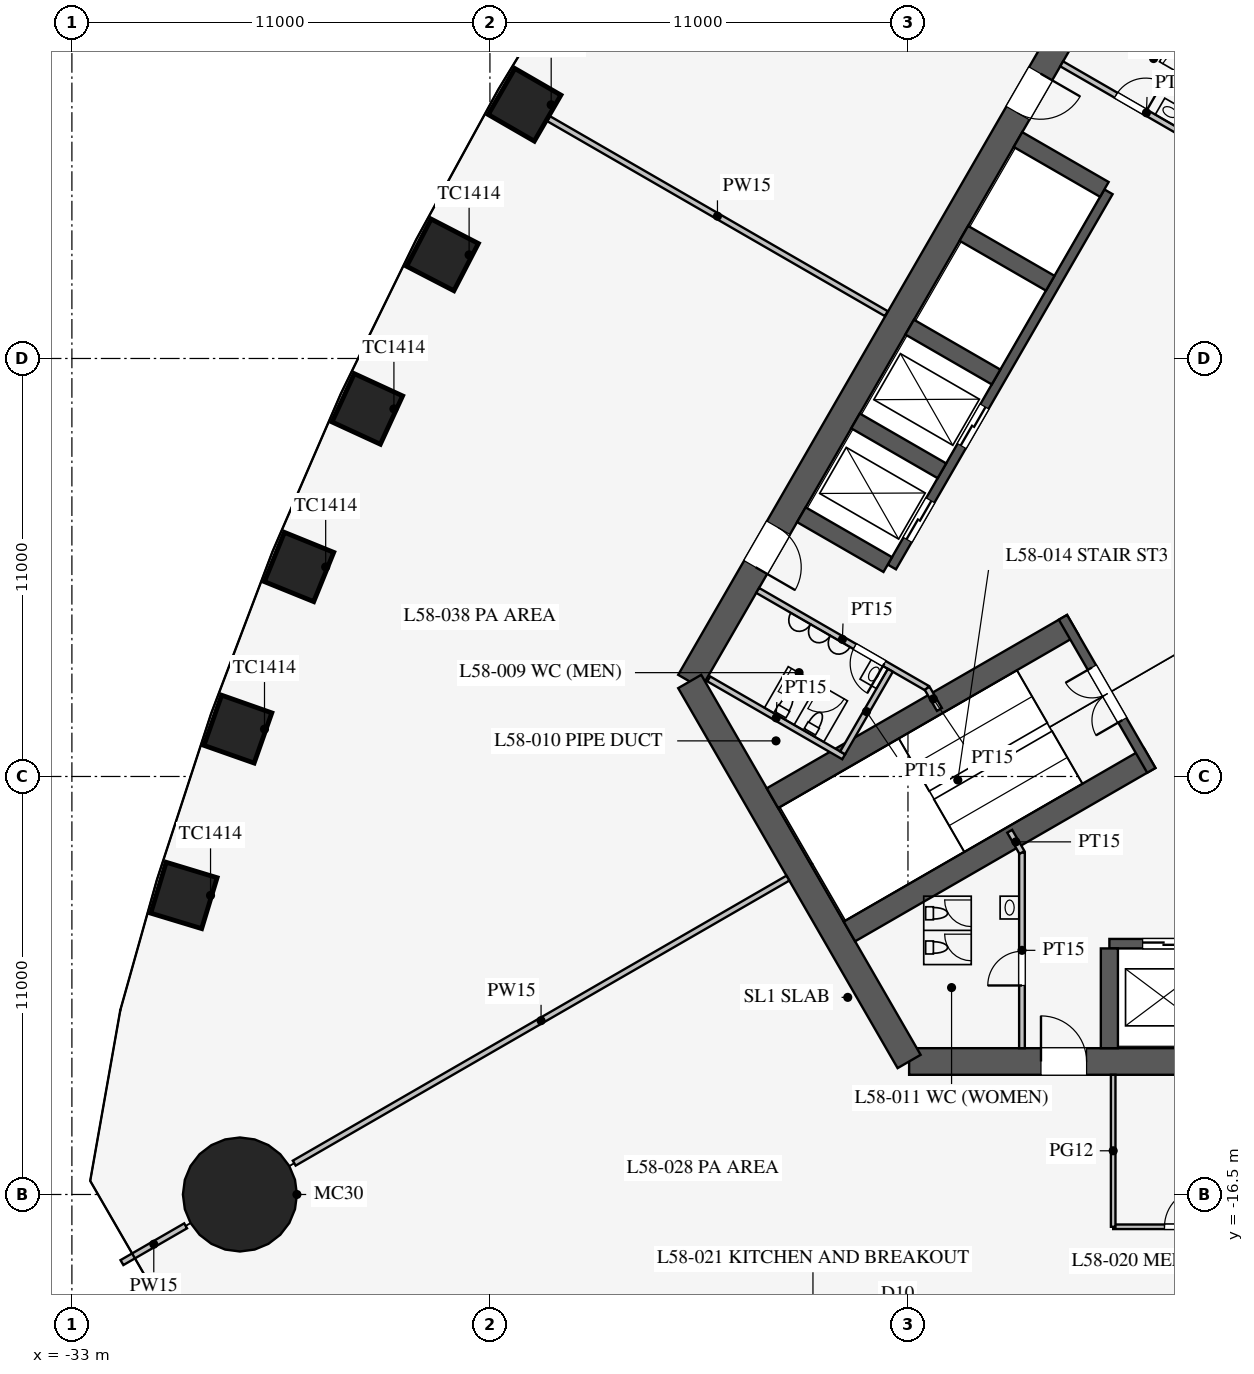
"""IFC4 building model, lengths in metres.
Left out: names, types, materials, properties, quantities, classifications, styles, units other than length and angle.
Written with IfcOpenShell. Run it as: python <this file> out.ifc"""

import sys

from ifc_helpers import new_model, si_unit, direction, frame, frame_2d, origin, origin_2d, place, context, subcontext, project, spatial, rectangle, circle, extrude, element, fill, save


model = new_model("IFC4")
c1 = context("Model", 3, precision=1e-05, world=origin(), true_north=direction((0.0, 1.0)))
c2 = subcontext(c1, "Body", "Model", "MODEL_VIEW")
j1 = project(units=[si_unit("LENGTHUNIT", "METRE"), si_unit("PLANEANGLEUNIT", "RADIAN")], contexts=[c1])
p1 = place(None, origin())
s1 = spatial("IfcSite", under=j1, at=p1, CompositionType="ELEMENT")
p2 = place(p1, origin())
s2 = spatial("IfcBuilding", under=s1, at=p2, CompositionType="ELEMENT")
p3 = place(p2, frame((0.0, 0.0, 252.7)))
s3 = spatial("IfcBuildingStorey", under=s2, at=p3, CompositionType="ELEMENT", Elevation=252.7)
for number, where, z_axis, x_axis in (
    (1, (-21.088, 12.175, 0.0), (0.0, 0.0, 1.0), (-0.5, -0.866, 0.0)),
    (2, (-23.248, 8.226, 0.0), (0.0, 0.0, 1.0), (-0.46, -0.888, 0.0)),
    (3, (-25.227, 4.172, 0.0), (0.0, 0.0, 1.0), (-0.418, -0.908, 0.0)),
    (4, (-27.022, 0.013, 0.0), (0.0, 0.0, 1.0), (-0.376, -0.927, 0.0)),
    (5, (-28.632, -4.254, 0.0), (0.0, 0.0, 1.0), (-0.332, -0.943, 0.0)),
    (6, (-30.052, -8.63, 0.0), (0.0, 0.0, 1.0), (-0.29, -0.957, 0.0)),
):
    element("IfcColumn", number, at=place(p3, frame(where, z_axis=z_axis, x_axis=x_axis)), inside=s3, PredefinedType="COLUMN", context=c2, shape_type="SweptSolid", body=[
        extrude(rectangle(XDim=1.4, YDim=1.4, at=origin_2d()), origin(), (0.0, 0.0, 1.0), 4.2),
    ])
p4 = place(p3, frame((-28.579, -16.5, 0.0), z_axis=(0.0, 0.0, 1.0), x_axis=(1.0, 0.0, 0.0)))
e7 = element("IfcColumn", 7, at=p4, inside=s3, PredefinedType="COLUMN", context=c2, shape_type="SweptSolid", body=[
    extrude(circle(Radius=1.5, at=origin_2d()), origin(), (0.0, 0.0, 1.0), 4.2),
])
p5 = place(p3, frame((-10.97, -13.0, 0.0), z_axis=(0.0, 0.0, 1.0), x_axis=(1.0, 0.0, 0.0)))
e8 = element("IfcWall", 8, at=p5, inside=s3, PredefinedType="SHEAR", context=c2, shape_type="SweptSolid", body=[
    extrude(rectangle(XDim=21.939, YDim=0.7, at=frame_2d((10.97, 0.0))), origin(), (0.0, 0.0, 1.0), 4.2),
])
p6 = place(p5, frame((17.27, 0.0, 0.0)))
e9 = element("IfcOpeningElement", 9, at=p6, cuts=e8, PredefinedType="OPENING", context=c2, shape_type="SweptSolid", body=[
    extrude(rectangle(XDim=1.2, YDim=2.1, at=frame_2d((0.6, 1.05))), frame((0.0, 0.36, 0.0), z_axis=(0.0, -1.0, 0.0), x_axis=(1.0, 0.0, 0.0)), (0.0, 0.0, 1.0), 0.72),
])
p7 = place(p5, frame((3.47, 0.0, 0.0)))
e10 = element("IfcOpeningElement", 10, at=p7, cuts=e8, PredefinedType="OPENING", context=c2, shape_type="SweptSolid", body=[
    extrude(rectangle(XDim=1.2, YDim=2.1, at=frame_2d((0.6, 1.05))), frame((0.0, 0.36, 0.0), z_axis=(0.0, -1.0, 0.0), x_axis=(1.0, 0.0, 0.0)), (0.0, 0.0, 1.0), 0.72),
])
p8 = place(p3, frame((-5.773, 16.0, 0.0), z_axis=(0.0, 0.0, 1.0), x_axis=(-0.500002442456, -0.866023993627, 0.0)))
e11 = element("IfcWall", 11, at=p8, inside=s3, PredefinedType="SHEAR", context=c2, shape_type="SweptSolid", body=[
    extrude(rectangle(XDim=21.939, YDim=0.7, at=frame_2d((10.97, 0.0))), origin(), (0.0, 0.0, 1.0), 4.2),
])
p9 = place(p8, frame((17.27, 0.0, 0.0)))
e12 = element("IfcOpeningElement", 12, at=p9, cuts=e11, PredefinedType="OPENING", context=c2, shape_type="SweptSolid", body=[
    extrude(rectangle(XDim=1.2, YDim=2.1, at=frame_2d((0.6, 1.05))), frame((0.0, 0.36, 0.0), z_axis=(0.0, -1.0, 0.0), x_axis=(1.0, 0.0, 0.0)), (0.0, 0.0, 1.0), 0.72),
])
p10 = place(p8, frame((3.47, 0.0, 0.0)))
e13 = element("IfcOpeningElement", 13, at=p10, cuts=e11, PredefinedType="OPENING", context=c2, shape_type="SweptSolid", body=[
    extrude(rectangle(XDim=1.2, YDim=2.1, at=frame_2d((0.6, 1.05))), frame((0.0, 0.36, 0.0), z_axis=(0.0, -1.0, 0.0), x_axis=(1.0, 0.0, 0.0)), (0.0, 0.0, 1.0), 0.72),
])
p11 = place(p3, frame((-16.743, -3.0, 0.0), z_axis=(0.0, 0.0, 1.0), x_axis=(0.499995765644, -0.866027848477, 0.0)))
e14 = element("IfcWall", 14, at=p11, inside=s3, PredefinedType="SHEAR", context=c2, shape_type="SweptSolid", body=[
    extrude(rectangle(XDim=11.547, YDim=0.7, at=frame_2d((5.773, 0.0))), origin(), (0.0, 0.0, 1.0), 4.2),
])
p12 = place(p3, frame((-5.7, -9.9, 0.0), z_axis=(0.0, 0.0, 1.0), x_axis=(1.0, 0.0, 0.0)))
e15 = element("IfcWall", 15, at=p12, inside=s3, PredefinedType="SHEAR", context=c2, shape_type="SweptSolid", body=[
    extrude(rectangle(XDim=11.4, YDim=0.25, at=frame_2d((5.7, 0.0))), origin(), (0.0, 0.0, 1.0), 4.2),
])
p13 = place(p12, frame((0.875, 0.0, 0.0)))
e16 = element("IfcOpeningElement", 16, at=p13, cuts=e15, PredefinedType="OPENING", context=c2, shape_type="SweptSolid", body=[
    extrude(rectangle(XDim=1.1, YDim=2.2, at=frame_2d((0.55, 1.1))), frame((0.0, 0.135, 0.0), z_axis=(0.0, -1.0, 0.0), x_axis=(1.0, 0.0, 0.0)), (0.0, 0.0, 1.0), 0.27),
])
p14 = place(p12, frame((3.725, 0.0, 0.0)))
e17 = element("IfcOpeningElement", 17, at=p14, cuts=e15, PredefinedType="OPENING", context=c2, shape_type="SweptSolid", body=[
    extrude(rectangle(XDim=1.1, YDim=2.2, at=frame_2d((0.55, 1.1))), frame((0.0, 0.135, 0.0), z_axis=(0.0, -1.0, 0.0), x_axis=(1.0, 0.0, 0.0)), (0.0, 0.0, 1.0), 0.27),
])
p15 = place(p12, frame((6.575, 0.0, 0.0)))
e18 = element("IfcOpeningElement", 18, at=p15, cuts=e15, PredefinedType="OPENING", context=c2, shape_type="SweptSolid", body=[
    extrude(rectangle(XDim=1.1, YDim=2.2, at=frame_2d((0.55, 1.1))), frame((0.0, 0.135, 0.0), z_axis=(0.0, -1.0, 0.0), x_axis=(1.0, 0.0, 0.0)), (0.0, 0.0, 1.0), 0.27),
])
p16 = place(p12, frame((9.425, 0.0, 0.0)))
e19 = element("IfcOpeningElement", 19, at=p16, cuts=e15, PredefinedType="OPENING", context=c2, shape_type="SweptSolid", body=[
    extrude(rectangle(XDim=1.1, YDim=2.2, at=frame_2d((0.55, 1.1))), frame((0.0, 0.135, 0.0), z_axis=(0.0, -1.0, 0.0), x_axis=(1.0, 0.0, 0.0)), (0.0, 0.0, 1.0), 0.27),
])
p17 = place(p3, frame((-5.7, -10.025, 0.0), z_axis=(0.0, 0.0, 1.0), x_axis=(0.0, -1.0, 0.0)))
e20 = element("IfcWall", 20, at=p17, inside=s3, PredefinedType="SHEAR", context=c2, shape_type="SweptSolid", body=[
    extrude(rectangle(XDim=2.625, YDim=0.45, at=frame_2d((1.312, 0.0))), origin(), (0.0, 0.0, 1.0), 4.2),
])
p18 = place(p3, frame((-5.724, 9.886, 0.0), z_axis=(0.0, 0.0, 1.0), x_axis=(-0.500001763848, -0.866024385424, 0.0)))
e21 = element("IfcWall", 21, at=p18, inside=s3, PredefinedType="SHEAR", context=c2, shape_type="SweptSolid", body=[
    extrude(rectangle(XDim=11.4, YDim=0.25, at=frame_2d((5.7, 0.0))), origin(), (0.0, 0.0, 1.0), 4.2),
])
p19 = place(p18, frame((6.525, 0.0, 0.0)))
e22 = element("IfcOpeningElement", 22, at=p19, cuts=e21, PredefinedType="OPENING", context=c2, shape_type="SweptSolid", body=[
    extrude(rectangle(XDim=1.2, YDim=2.2, at=frame_2d((0.6, 1.1))), frame((0.0, 0.135, 0.0), z_axis=(0.0, -1.0, 0.0), x_axis=(1.0, 0.0, 0.0)), (0.0, 0.0, 1.0), 0.27),
])
p20 = place(p18, frame((9.375, 0.0, 0.0)))
e23 = element("IfcOpeningElement", 23, at=p20, cuts=e21, PredefinedType="OPENING", context=c2, shape_type="SweptSolid", body=[
    extrude(rectangle(XDim=1.2, YDim=2.2, at=frame_2d((0.6, 1.1))), frame((0.0, 0.135, 0.0), z_axis=(0.0, -1.0, 0.0), x_axis=(1.0, 0.0, 0.0)), (0.0, 0.0, 1.0), 0.27),
])
for number, where, z_axis, x_axis in (
    (24, (-5.832, 9.949, 0.0), (0.0, 0.0, 1.0), (-0.866, 0.5, 0.0)),
    (25, (-7.257, 7.481, 0.0), (0.0, 0.0, 1.0), (-0.866, 0.5, 0.0)),
    (26, (-8.682, 5.012, 0.0), (0.0, 0.0, 1.0), (-0.866, 0.5, 0.0)),
    (27, (-10.107, 2.544, 0.0), (0.0, 0.0, 1.0), (-0.866, 0.5, 0.0)),
    (28, (-11.532, 0.076, 0.0), (0.0, 0.0, 1.0), (-0.866, 0.5, 0.0)),
):
    element("IfcWall", number, at=place(p3, frame(where, z_axis=z_axis, x_axis=x_axis)), inside=s3, PredefinedType="SHEAR", context=c2, shape_type="SweptSolid", body=[
        extrude(rectangle(XDim=2.625, YDim=0.45, at=frame_2d((1.312, 0.0))), origin(), (0.0, 0.0, 1.0), 4.2),
    ])
for number, where, z_axis, x_axis in (
    (29, (-6.663, -1.509, 0.0), (0.0, 0.0, 1.0), (-0.866, -0.5, 0.0)),
    (30, (-4.638, -5.016, 0.0), (0.0, 0.0, 1.0), (-0.866, -0.5, 0.0)),
):
    element("IfcWall", number, at=place(p3, frame(where, z_axis=z_axis, x_axis=x_axis)), inside=s3, PredefinedType="SHEAR", context=c2, shape_type="SweptSolid", body=[
        extrude(rectangle(XDim=9.125, YDim=0.6, at=frame_2d((4.562, 0.0))), origin(), (0.0, 0.0, 1.0), 4.2),
    ])
p21 = place(p3, frame((-6.922, -1.312, 0.0), z_axis=(0.0, 0.0, 1.0), x_axis=(0.499984536904, -0.866034331223, 0.0)))
e31 = element("IfcWall", 31, at=p21, inside=s3, PredefinedType="SHEAR", context=c2, shape_type="SweptSolid", body=[
    extrude(rectangle(XDim=4.65, YDim=0.25, at=frame_2d((2.325, 0.0))), origin(), (0.0, 0.0, 1.0), 4.2),
])
p22 = place(p21, frame((1.525, 0.0, 0.0)))
e32 = element("IfcOpeningElement", 32, at=p22, cuts=e31, PredefinedType="OPENING", context=c2, shape_type="SweptSolid", body=[
    extrude(rectangle(XDim=1.6, YDim=2.1, at=frame_2d((0.8, 1.05))), frame((0.0, 0.135, 0.0), z_axis=(0.0, -1.0, 0.0), x_axis=(1.0, 0.0, 0.0)), (0.0, 0.0, 1.0), 0.27),
])
p23 = place(p3, frame((-8.0, -7.5, 0.0), z_axis=(0.0, 0.0, 1.0), x_axis=(0.0, -1.0, 0.0)))
e33 = element("IfcWall", 33, at=p23, inside=s3, PredefinedType="PARTITIONING", context=c2, shape_type="SweptSolid", body=[
    extrude(rectangle(XDim=5.15, YDim=0.15, at=frame_2d((2.575, 0.0))), origin(), (0.0, 0.0, 1.0), 4.0),
])
p24 = place(p23, frame((2.6, 0.0, 0.0)))
e34 = element("IfcOpeningElement", 34, at=p24, cuts=e33, PredefinedType="OPENING", context=c2, shape_type="SweptSolid", body=[
    extrude(rectangle(XDim=0.9, YDim=2.1, at=frame_2d((0.45, 1.05))), frame((0.0, 0.085, 0.0), z_axis=(0.0, -1.0, 0.0), x_axis=(1.0, 0.0, 0.0)), (0.0, 0.0, 1.0), 0.17),
])
p25 = place(p3, frame((-10.495, -3.178, 0.0), z_axis=(0.0, 0.0, 1.0), x_axis=(-0.866037967349, 0.499978238636, 0.0)))
e35 = element("IfcWall", 35, at=p25, inside=s3, PredefinedType="PARTITIONING", context=c2, shape_type="SweptSolid", body=[
    extrude(rectangle(XDim=5.15, YDim=0.15, at=frame_2d((2.575, 0.0))), origin(), (0.0, 0.0, 1.0), 4.0),
])
p26 = place(p25, frame((1.3, 0.0, 0.0)))
e36 = element("IfcOpeningElement", 36, at=p26, cuts=e35, PredefinedType="OPENING", context=c2, shape_type="SweptSolid", body=[
    extrude(rectangle(XDim=0.9, YDim=2.1, at=frame_2d((0.45, 1.05))), frame((0.0, 0.085, 0.0), z_axis=(0.0, -1.0, 0.0), x_axis=(1.0, 0.0, 0.0)), (0.0, 0.0, 1.0), 0.17),
])
p27 = place(p3, frame((-2.495, 10.678, 0.0), z_axis=(0.0, 0.0, 1.0), x_axis=(-0.866037967349, 0.499978238636, 0.0)))
e37 = element("IfcWall", 37, at=p27, inside=s3, PredefinedType="PARTITIONING", context=c2, shape_type="SweptSolid", body=[
    extrude(rectangle(XDim=5.15, YDim=0.15, at=frame_2d((2.575, 0.0))), origin(), (0.0, 0.0, 1.0), 4.0),
])
p28 = place(p27, frame((2.6, 0.0, 0.0)))
e38 = element("IfcOpeningElement", 38, at=p28, cuts=e37, PredefinedType="OPENING", context=c2, shape_type="SweptSolid", body=[
    extrude(rectangle(XDim=0.9, YDim=2.1, at=frame_2d((0.45, 1.05))), frame((0.0, 0.085, 0.0), z_axis=(0.0, -1.0, 0.0), x_axis=(1.0, 0.0, 0.0)), (0.0, 0.0, 1.0), 0.17),
])
for number, where, z_axis, x_axis in (
    (39, (-10.495, -3.178, 0.0), (0.0, 0.0, 1.0), (0.5, -0.866, 0.0)),
    (40, (-8.0, -7.5, 0.0), (0.0, 0.0, 1.0), (-0.5, 0.866, 0.0)),
):
    element("IfcWall", number, at=place(p3, frame(where, z_axis=z_axis, x_axis=x_axis)), inside=s3, PredefinedType="PARTITIONING", context=c2, shape_type="SweptSolid", body=[
        extrude(rectangle(XDim=0.645, YDim=0.15, at=frame_2d((0.323, 0.0))), origin(), (0.0, 0.0, 1.0), 4.0),
    ])
p29 = place(p3, frame((-2.031, 13.482, 0.0), z_axis=(0.0, 0.0, 1.0), x_axis=(-0.866050731258, 0.499956128963, 0.0)))
e41 = element("IfcWall", 41, at=p29, inside=s3, PredefinedType="PARTITIONING", context=c2, shape_type="SweptSolid", body=[
    extrude(rectangle(XDim=4.1, YDim=0.15, at=frame_2d((2.05, 0.0))), origin(), (0.0, 0.0, 1.0), 4.0),
])
p30 = place(p3, frame((-12.691, -4.982, 0.0), z_axis=(0.0, 0.0, 1.0), x_axis=(-0.8660249478, 0.500000789788, 0.0)))
e42 = element("IfcWall", 42, at=p30, inside=s3, PredefinedType="PARTITIONING", context=c2, shape_type="SweptSolid", body=[
    extrude(rectangle(XDim=4.1, YDim=0.15, at=frame_2d((2.05, 0.0))), origin(), (0.0, 0.0, 1.0), 4.0),
])
p31 = place(p3, frame((-11.464, -2.706, 0.0), z_axis=(0.0, 0.0, 1.0), x_axis=(-0.50001992892, -0.866013897511, 0.0)))
e43 = element("IfcWall", 43, at=p31, inside=s3, PredefinedType="PARTITIONING", context=c2, shape_type="SweptSolid", body=[
    extrude(rectangle(XDim=2.51, YDim=0.15, at=frame_2d((1.255, 0.0))), origin(), (0.0, 0.0, 1.0), 4.0),
])
p32 = place(p3, frame((-14.159, -8.175, 0.0), z_axis=(0.0, 0.0, 1.0), x_axis=(-0.866027028085, -0.499997186618, 0.0)))
e44 = element("IfcWall", 44, at=p32, inside=s3, PredefinedType="PARTITIONING", context=c2, shape_type="SweptSolid", body=[
    extrude(rectangle(XDim=15.0, YDim=0.15, at=frame_2d((7.5, 0.0))), origin(), (0.0, 0.0, 1.0), 2.4),
])
p33 = place(p3, frame((-30.008, -17.325, 0.0), z_axis=(0.0, 0.0, 1.0), x_axis=(-0.866013246922, -0.500021055713, 0.0)))
e45 = element("IfcWall", 45, at=p33, inside=s3, PredefinedType="PARTITIONING", context=c2, shape_type="SweptSolid", body=[
    extrude(rectangle(XDim=1.935, YDim=0.15, at=frame_2d((0.967, 0.0))), origin(), (0.0, 0.0, 1.0), 2.4),
])
p34 = place(p3, frame((-5.6, -17.35, 0.0), z_axis=(0.0, 0.0, 1.0), x_axis=(1.0, 0.0, 0.0)))
e46 = element("IfcWall", 46, at=p34, inside=s3, PredefinedType="PARTITIONING", context=c2, shape_type="SweptSolid", body=[
    extrude(rectangle(XDim=3.6, YDim=0.12, at=frame_2d((1.8, 0.0))), origin(), (0.0, 0.0, 1.0), 2.9),
])
p35 = place(p34, frame((1.35, 0.0, 0.15)))
e47 = element("IfcOpeningElement", 47, at=p35, cuts=e46, PredefinedType="OPENING", context=c2, shape_type="SweptSolid", body=[
    extrude(rectangle(XDim=1.0, YDim=2.1, at=frame_2d((0.5, 1.05))), frame((0.0, 0.07, 0.0), z_axis=(0.0, -1.0, 0.0), x_axis=(1.0, 0.0, 0.0)), (0.0, 0.0, 1.0), 0.14),
])
p36 = place(p3, frame((-5.6, -13.35, 0.0), z_axis=(0.0, 0.0, 1.0), x_axis=(0.0, -1.0, 0.0)))
e48 = element("IfcWall", 48, at=p36, inside=s3, PredefinedType="PARTITIONING", context=c2, shape_type="SweptSolid", body=[
    extrude(rectangle(XDim=4.0, YDim=0.12, at=frame_2d((2.0, 0.0))), origin(), (0.0, 0.0, 1.0), 2.9),
])
p37 = place(p3, frame((-11.57, 6.68, 0.0), z_axis=(0.0, 0.0, 1.0), x_axis=(-0.866023526028, 0.500003252355, 0.0)))
e49 = element("IfcWall", 49, at=p37, inside=s3, PredefinedType="PARTITIONING", context=c2, shape_type="SweptSolid", body=[
    extrude(rectangle(XDim=10.261, YDim=0.15, at=frame_2d((5.13, 0.0))), origin(), (0.0, 0.0, 1.0), 2.992),
])
p38 = place(p24, frame((0.9, 0.0, 0.0), z_axis=(0.0, 0.0, 1.0), x_axis=(-1.0, 0.0, 0.0)))
e50 = element("IfcDoor", 50, at=p38, inside=s3, OperationType="SINGLE_SWING_LEFT", PredefinedType="DOOR", context=c2, shape_type="SweptSolid", body=[
    extrude(rectangle(XDim=0.9, YDim=2.1, at=frame_2d((0.45, 1.05))), frame((0.0, 0.025, 0.0), z_axis=(0.0, -1.0, 0.0), x_axis=(1.0, 0.0, 0.0)), (0.0, 0.0, 1.0), 0.05),
])
fill(e34, e50)
p39 = place(p26, origin())
e51 = element("IfcDoor", 51, at=p39, inside=s3, OperationType="SINGLE_SWING_LEFT", PredefinedType="DOOR", context=c2, shape_type="SweptSolid", body=[
    extrude(rectangle(XDim=0.9, YDim=2.1, at=frame_2d((0.45, 1.05))), frame((0.0, 0.025, 0.0), z_axis=(0.0, -1.0, 0.0), x_axis=(1.0, 0.0, 0.0)), (0.0, 0.0, 1.0), 0.05),
])
fill(e36, e51)
p40 = place(p28, frame((0.9, 0.0, 0.0), z_axis=(0.0, 0.0, 1.0), x_axis=(-1.0, 0.0, 0.0)))
e52 = element("IfcDoor", 52, at=p40, inside=s3, OperationType="SINGLE_SWING_RIGHT", PredefinedType="DOOR", context=c2, shape_type="SweptSolid", body=[
    extrude(rectangle(XDim=0.9, YDim=2.1, at=frame_2d((0.45, 1.05))), frame((0.0, 0.025, 0.0), z_axis=(0.0, -1.0, 0.0), x_axis=(1.0, 0.0, 0.0)), (0.0, 0.0, 1.0), 0.05),
])
fill(e38, e52)
p41 = place(p22, frame((1.6, 0.0, 0.0), z_axis=(0.0, 0.0, 1.0), x_axis=(-1.0, 0.0, 0.0)))
e53 = element("IfcDoor", 53, at=p41, inside=s3, OperationType="DOUBLE_DOOR_SINGLE_SWING", PredefinedType="DOOR", context=c2, shape_type="SweptSolid", body=[
    extrude(rectangle(XDim=1.6, YDim=2.1, at=frame_2d((0.8, 1.05))), frame((0.0, 0.025, 0.0), z_axis=(0.0, -1.0, 0.0), x_axis=(1.0, 0.0, 0.0)), (0.0, 0.0, 1.0), 0.05),
])
fill(e32, e53)
p42 = place(p7, origin())
e54 = element("IfcDoor", 54, at=p42, inside=s3, OperationType="SINGLE_SWING_LEFT", PredefinedType="DOOR", context=c2, shape_type="SweptSolid", body=[
    extrude(rectangle(XDim=1.2, YDim=2.1, at=frame_2d((0.6, 1.05))), frame((0.0, 0.025, 0.0), z_axis=(0.0, -1.0, 0.0), x_axis=(1.0, 0.0, 0.0)), (0.0, 0.0, 1.0), 0.05),
])
fill(e10, e54)
p43 = place(p9, origin())
e55 = element("IfcDoor", 55, at=p43, inside=s3, OperationType="SINGLE_SWING_RIGHT", PredefinedType="DOOR", context=c2, shape_type="SweptSolid", body=[
    extrude(rectangle(XDim=1.2, YDim=2.1, at=frame_2d((0.6, 1.05))), frame((0.0, 0.025, 0.0), z_axis=(0.0, -1.0, 0.0), x_axis=(1.0, 0.0, 0.0)), (0.0, 0.0, 1.0), 0.05),
])
fill(e12, e55)
p44 = place(p10, origin())
e56 = element("IfcDoor", 56, at=p44, inside=s3, OperationType="SINGLE_SWING_LEFT", PredefinedType="DOOR", context=c2, shape_type="SweptSolid", body=[
    extrude(rectangle(XDim=1.2, YDim=2.1, at=frame_2d((0.6, 1.05))), frame((0.0, 0.025, 0.0), z_axis=(0.0, -1.0, 0.0), x_axis=(1.0, 0.0, 0.0)), (0.0, 0.0, 1.0), 0.05),
])
fill(e13, e56)
p45 = place(p35, origin())
e57 = element("IfcDoor", 57, at=p45, inside=s3, OperationType="SINGLE_SWING_RIGHT", PredefinedType="DOOR", context=c2, shape_type="SweptSolid", body=[
    extrude(rectangle(XDim=1.0, YDim=2.1, at=frame_2d((0.5, 1.05))), frame((0.0, 0.025, 0.0), z_axis=(0.0, -1.0, 0.0), x_axis=(1.0, 0.0, 0.0)), (0.0, 0.0, 1.0), 0.05),
])
fill(e47, e57)
p46 = place(p13, origin())
e58 = element("IfcDoor", 58, at=p46, inside=s3, OperationType="DOUBLE_DOOR_SLIDING", PredefinedType="DOOR", context=c2, shape_type="SweptSolid", body=[
    extrude(rectangle(XDim=1.1, YDim=2.2, at=frame_2d((0.55, 1.1))), frame((0.0, 0.025, 0.0), z_axis=(0.0, -1.0, 0.0), x_axis=(1.0, 0.0, 0.0)), (0.0, 0.0, 1.0), 0.05),
])
fill(e16, e58)
p47 = place(p19, origin())
e59 = element("IfcDoor", 59, at=p47, inside=s3, OperationType="DOUBLE_DOOR_SLIDING", PredefinedType="DOOR", context=c2, shape_type="SweptSolid", body=[
    extrude(rectangle(XDim=1.2, YDim=2.2, at=frame_2d((0.6, 1.1))), frame((0.0, 0.025, 0.0), z_axis=(0.0, -1.0, 0.0), x_axis=(1.0, 0.0, 0.0)), (0.0, 0.0, 1.0), 0.05),
])
fill(e22, e59)
p48 = place(p20, origin())
e60 = element("IfcDoor", 60, at=p48, inside=s3, OperationType="DOUBLE_DOOR_SLIDING", PredefinedType="DOOR", context=c2, shape_type="SweptSolid", body=[
    extrude(rectangle(XDim=1.2, YDim=2.2, at=frame_2d((0.6, 1.1))), frame((0.0, 0.025, 0.0), z_axis=(0.0, -1.0, 0.0), x_axis=(1.0, 0.0, 0.0)), (0.0, 0.0, 1.0), 0.05),
])
fill(e23, e60)
save(model, sys.argv[1])
